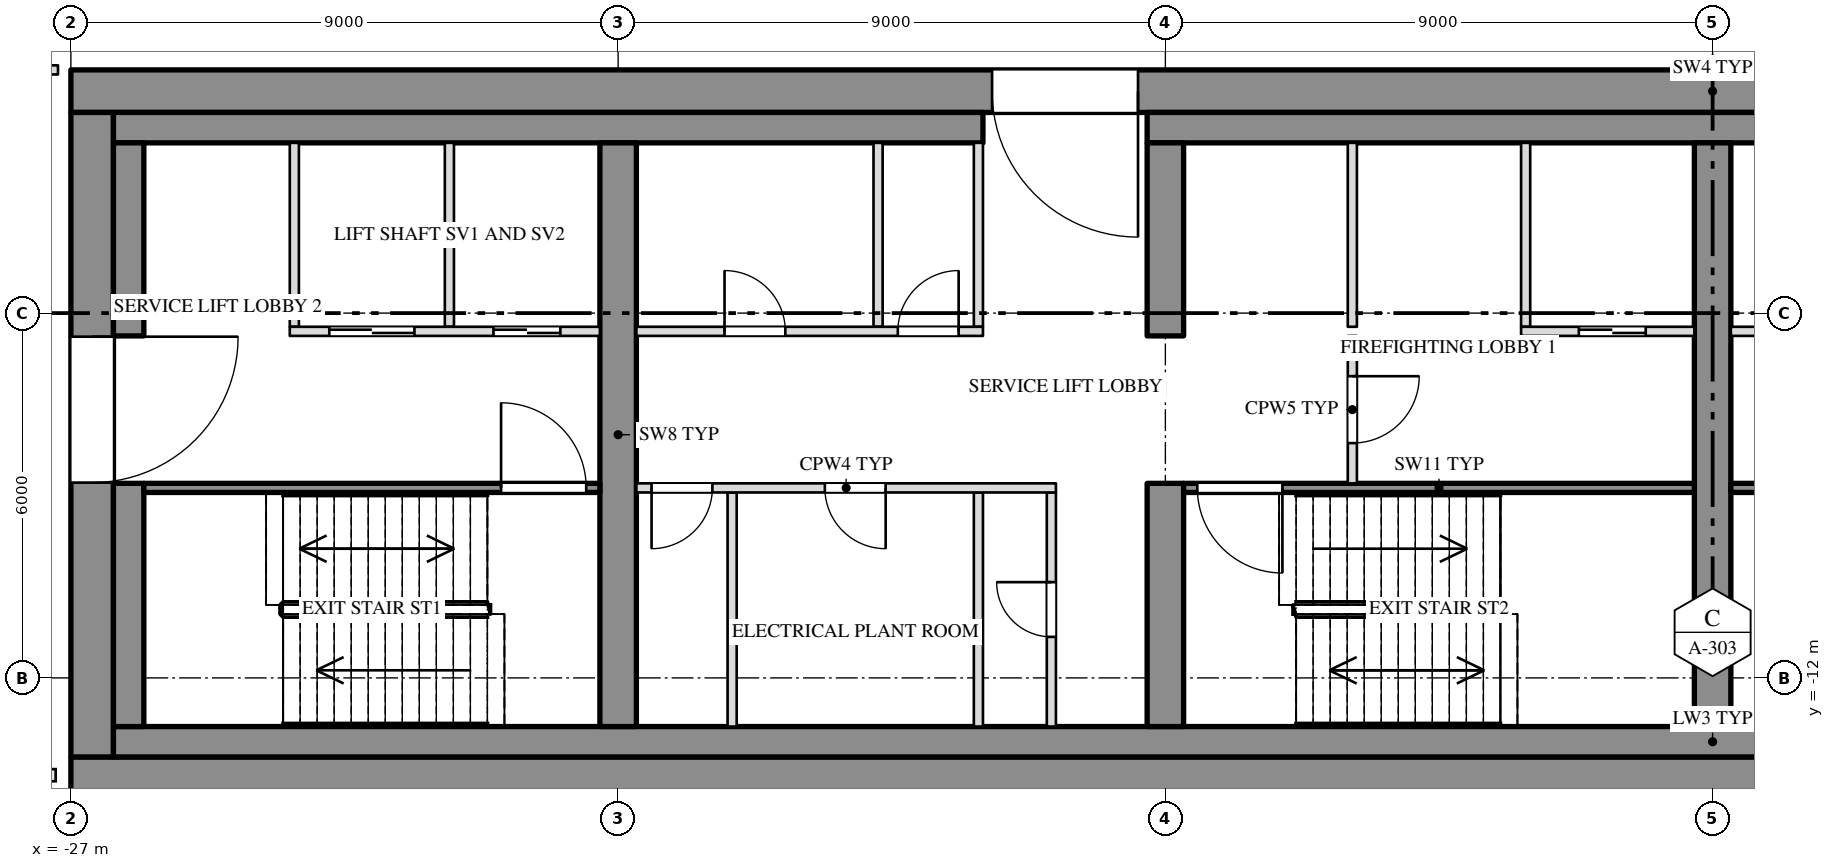
"""IFC4 building model, lengths in metres.
Left out: names, types, materials, properties, quantities, classifications, styles, units other than length and angle.
Written with IfcOpenShell. Run it as: python <this file> out.ifc"""

import sys

from ifc_helpers import new_model, si_unit, direction, frame, frame_2d, origin, place, context, subcontext, project, spatial, rectangle, extrude, element, fill, save


model = new_model("IFC4")
c1 = context("Model", 3, precision=1e-05, world=origin(), true_north=direction((0.0, 1.0)))
c2 = subcontext(c1, "Body", "Model", "MODEL_VIEW")
j1 = project(units=[si_unit("LENGTHUNIT", "METRE"), si_unit("PLANEANGLEUNIT", "RADIAN")], contexts=[c1])
p1 = place(None, origin())
s1 = spatial("IfcSite", under=j1, at=p1, CompositionType="ELEMENT")
p2 = place(p1, origin())
s2 = spatial("IfcBuilding", under=s1, at=p2, CompositionType="ELEMENT")
p3 = place(p2, frame((0.0, 0.0, 216.5)))
s3 = spatial("IfcBuildingStorey", under=s2, at=p3, CompositionType="ELEMENT", Elevation=216.5)
p4 = place(p3, frame((-27.0, -2.35, 0.0), z_axis=(0.0, 0.0, 1.0), x_axis=(1.0, 0.0, 0.0)))
e1 = element("IfcWall", 1, at=p4, inside=s3, PredefinedType="SHEAR", context=c2, shape_type="SweptSolid", body=[
    extrude(rectangle(XDim=54.0, YDim=0.7, at=frame_2d((27.0, 0.0))), origin(), (0.0, 0.0, 1.0), 3.8),
])
p5 = place(p4, frame((15.15, 0.0, 0.0)))
e2 = element("IfcOpeningElement", 2, at=p5, cuts=e1, PredefinedType="OPENING", context=c2, shape_type="SweptSolid", body=[
    extrude(rectangle(XDim=2.4, YDim=2.1, at=frame_2d((1.2, 1.05))), frame((0.0, 0.362, 0.0), z_axis=(0.0, -1.0, 0.0), x_axis=(1.0, 0.0, 0.0)), (0.0, 0.0, 1.0), 0.724),
])
p6 = place(p4, frame((36.45, 0.0, 0.0)))
e3 = element("IfcOpeningElement", 3, at=p6, cuts=e1, PredefinedType="OPENING", context=c2, shape_type="SweptSolid", body=[
    extrude(rectangle(XDim=2.4, YDim=2.1, at=frame_2d((1.2, 1.05))), frame((0.0, 0.362, 0.0), z_axis=(0.0, -1.0, 0.0), x_axis=(1.0, 0.0, 0.0)), (0.0, 0.0, 1.0), 0.724),
])
p7 = place(p3, frame((-27.0, -13.65, 0.0), z_axis=(0.0, 0.0, 1.0), x_axis=(1.0, 0.0, 0.0)))
e4 = element("IfcWall", 4, at=p7, inside=s3, PredefinedType="SHEAR", context=c2, shape_type="SweptSolid", body=[
    extrude(rectangle(XDim=54.0, YDim=0.7, at=frame_2d((27.0, 0.0))), origin(), (0.0, 0.0, 1.0), 3.8),
])
p8 = place(p3, frame((-26.65, -13.3, 0.0), z_axis=(0.0, 0.0, 1.0), x_axis=(0.0, 1.0, 0.0)))
e5 = element("IfcWall", 5, at=p8, inside=s3, PredefinedType="SHEAR", context=c2, shape_type="SweptSolid", body=[
    extrude(rectangle(XDim=10.6, YDim=0.7, at=frame_2d((5.3, 0.0))), origin(), (0.0, 0.0, 1.0), 3.8),
])
p9 = place(p8, frame((4.512, 0.0, 0.0)))
e6 = element("IfcOpeningElement", 6, at=p9, cuts=e5, PredefinedType="OPENING", context=c2, shape_type="SweptSolid", body=[
    extrude(rectangle(XDim=2.4, YDim=2.1, at=frame_2d((1.2, 1.05))), frame((0.0, 0.362, 0.0), z_axis=(0.0, -1.0, 0.0), x_axis=(1.0, 0.0, 0.0)), (0.0, 0.0, 1.0), 0.724),
])
p10 = place(p3, frame((-26.3, -2.95, 0.0), z_axis=(0.0, 0.0, 1.0), x_axis=(1.0, 0.0, 0.0)))
e7 = element("IfcWall", 7, at=p10, inside=s3, PredefinedType="SHEAR", context=c2, shape_type="SweptSolid", body=[
    extrude(rectangle(XDim=14.3, YDim=0.5, at=frame_2d((7.15, 0.0))), origin(), (0.0, 0.0, 1.0), 3.8),
])
p11 = place(p3, frame((-9.3, -2.95, 0.0), z_axis=(0.0, 0.0, 1.0), x_axis=(1.0, 0.0, 0.0)))
e8 = element("IfcWall", 8, at=p11, inside=s3, PredefinedType="SHEAR", context=c2, shape_type="SweptSolid", body=[
    extrude(rectangle(XDim=18.6, YDim=0.5, at=frame_2d((9.3, 0.0))), origin(), (0.0, 0.0, 1.0), 3.8),
])
p12 = place(p3, frame((-26.3, -13.05, 0.0), z_axis=(0.0, 0.0, 1.0), x_axis=(1.0, 0.0, 0.0)))
e9 = element("IfcWall", 9, at=p12, inside=s3, PredefinedType="SHEAR", context=c2, shape_type="SweptSolid", body=[
    extrude(rectangle(XDim=52.6, YDim=0.5, at=frame_2d((26.3, 0.0))), origin(), (0.0, 0.0, 1.0), 3.8),
])
p13 = place(p3, frame((-26.05, -12.8, 0.0), z_axis=(0.0, 0.0, 1.0), x_axis=(0.0, 1.0, 0.0)))
e10 = element("IfcWall", 10, at=p13, inside=s3, PredefinedType="SHEAR", context=c2, shape_type="SweptSolid", body=[
    extrude(rectangle(XDim=4.0, YDim=0.5, at=frame_2d((2.0, 0.0))), origin(), (0.0, 0.0, 1.0), 3.8),
])
p14 = place(p3, frame((-26.05, -6.375, 0.0), z_axis=(0.0, 0.0, 1.0), x_axis=(0.0, 1.0, 0.0)))
e11 = element("IfcWall", 11, at=p14, inside=s3, PredefinedType="SHEAR", context=c2, shape_type="SweptSolid", body=[
    extrude(rectangle(XDim=3.175, YDim=0.5, at=frame_2d((1.587, 0.0))), origin(), (0.0, 0.0, 1.0), 3.8),
])
p15 = place(p3, frame((-18.0, -12.8, 0.0), z_axis=(0.0, 0.0, 1.0), x_axis=(0.0, 1.0, 0.0)))
e12 = element("IfcWall", 12, at=p15, inside=s3, PredefinedType="SHEAR", context=c2, shape_type="SweptSolid", body=[
    extrude(rectangle(XDim=9.6, YDim=0.6, at=frame_2d((4.8, 0.0))), origin(), (0.0, 0.0, 1.0), 3.8),
])
p16 = place(p3, frame((-9.0, -12.8, 0.0), z_axis=(0.0, 0.0, 1.0), x_axis=(0.0, 1.0, 0.0)))
e13 = element("IfcWall", 13, at=p16, inside=s3, PredefinedType="SHEAR", context=c2, shape_type="SweptSolid", body=[
    extrude(rectangle(XDim=4.0, YDim=0.6, at=frame_2d((2.0, 0.0))), origin(), (0.0, 0.0, 1.0), 3.8),
])
p17 = place(p3, frame((-9.0, -6.375, 0.0), z_axis=(0.0, 0.0, 1.0), x_axis=(0.0, 1.0, 0.0)))
e14 = element("IfcWall", 14, at=p17, inside=s3, PredefinedType="SHEAR", context=c2, shape_type="SweptSolid", body=[
    extrude(rectangle(XDim=3.175, YDim=0.6, at=frame_2d((1.587, 0.0))), origin(), (0.0, 0.0, 1.0), 3.8),
])
p18 = place(p3, frame((0.0, -12.8, 0.0), z_axis=(0.0, 0.0, 1.0), x_axis=(0.0, 1.0, 0.0)))
e15 = element("IfcWall", 15, at=p18, inside=s3, PredefinedType="SHEAR", context=c2, shape_type="SweptSolid", body=[
    extrude(rectangle(XDim=9.6, YDim=0.6, at=frame_2d((4.8, 0.0))), origin(), (0.0, 0.0, 1.0), 3.8),
])
p19 = place(p3, frame((-30.975, -2.0, 0.0), z_axis=(0.0, 0.0, 1.0), x_axis=(1.0, 0.0, 0.0)))
e16 = element("IfcWall", 16, at=p19, inside=s3, PredefinedType="PARTITIONING", context=c2, shape_type="SweptSolid", body=[
    extrude(rectangle(XDim=3.763, YDim=0.15, at=frame_2d((1.882, 0.0))), origin(), (0.0, 0.0, 1.0), 3.8),
])
p20 = place(p19, frame((1.425, 0.0, 0.0)))
e17 = element("IfcOpeningElement", 17, at=p20, cuts=e16, PredefinedType="OPENING", context=c2, shape_type="SweptSolid", body=[
    extrude(rectangle(XDim=1.0, YDim=2.1, at=frame_2d((0.5, 1.05))), frame((0.0, 0.087, 0.0), z_axis=(0.0, -1.0, 0.0), x_axis=(1.0, 0.0, 0.0)), (0.0, 0.0, 1.0), 0.174),
])
for number, where, z_axis, x_axis in (
    (18, (-20.775, -6.225, 0.0), (0.0, 0.0, 1.0), (0.0, 1.0, 0.0)),
    (19, (-23.325, -6.225, 0.0), (0.0, 0.0, 1.0), (0.0, 1.0, 0.0)),
    (20, (-12.075, -6.225, 0.0), (0.0, 0.0, 1.0), (0.0, 1.0, 0.0)),
    (21, (-13.725, -6.225, 0.0), (0.0, 0.0, 1.0), (0.0, 1.0, 0.0)),
    (22, (-3.075, -6.225, 0.0), (0.0, 0.0, 1.0), (0.0, 1.0, 0.0)),
    (23, (-5.925, -6.225, 0.0), (0.0, 0.0, 1.0), (0.0, 1.0, 0.0)),
):
    element("IfcWall", number, at=place(p3, frame(where, z_axis=z_axis, x_axis=x_axis)), inside=s3, PredefinedType="PARTITIONING", context=c2, shape_type="SweptSolid", body=[
        extrude(rectangle(XDim=3.025, YDim=0.15, at=frame_2d((1.513, 0.0))), origin(), (0.0, 0.0, 1.0), 3.8),
    ])
p21 = place(p3, frame((-10.875, -12.8, 0.0), z_axis=(0.0, 0.0, 1.0), x_axis=(0.0, 1.0, 0.0)))
e24 = element("IfcWall", 24, at=p21, inside=s3, PredefinedType="PARTITIONING", context=c2, shape_type="SweptSolid", body=[
    extrude(rectangle(XDim=3.85, YDim=0.15, at=frame_2d((1.925, 0.0))), origin(), (0.0, 0.0, 1.0), 3.8),
])
p22 = place(p21, frame((1.475, 0.0, 0.0)))
e25 = element("IfcOpeningElement", 25, at=p22, cuts=e24, PredefinedType="OPENING", context=c2, shape_type="SweptSolid", body=[
    extrude(rectangle(XDim=0.9, YDim=2.1, at=frame_2d((0.45, 1.05))), frame((0.0, 0.087, 0.0), z_axis=(0.0, -1.0, 0.0), x_axis=(1.0, 0.0, 0.0)), (0.0, 0.0, 1.0), 0.174),
])
for number, where, z_axis, x_axis in (
    (26, (-12.075, -12.8, 0.0), (0.0, 0.0, 1.0), (0.0, 1.0, 0.0)),
    (27, (-16.125, -12.8, 0.0), (0.0, 0.0, 1.0), (0.0, 1.0, 0.0)),
):
    element("IfcWall", number, at=place(p3, frame(where, z_axis=z_axis, x_axis=x_axis)), inside=s3, PredefinedType="PARTITIONING", context=c2, shape_type="SweptSolid", body=[
        extrude(rectangle(XDim=3.85, YDim=0.15, at=frame_2d((1.925, 0.0))), origin(), (0.0, 0.0, 1.0), 3.8),
    ])
p23 = place(p3, frame((-5.925, -8.8, 0.0), z_axis=(0.0, 0.0, 1.0), x_axis=(0.0, 1.0, 0.0)))
e28 = element("IfcWall", 28, at=p23, inside=s3, PredefinedType="PARTITIONING", context=c2, shape_type="SweptSolid", body=[
    extrude(rectangle(XDim=2.425, YDim=0.15, at=frame_2d((1.212, 0.0))), origin(), (0.0, 0.0, 1.0), 3.8),
])
p24 = place(p23, frame((0.662, 0.0, 0.0)))
e29 = element("IfcOpeningElement", 29, at=p24, cuts=e28, PredefinedType="OPENING", context=c2, shape_type="SweptSolid", body=[
    extrude(rectangle(XDim=1.1, YDim=2.1, at=frame_2d((0.55, 1.05))), frame((0.0, 0.087, 0.0), z_axis=(0.0, -1.0, 0.0), x_axis=(1.0, 0.0, 0.0)), (0.0, 0.0, 1.0), 0.174),
])
p25 = place(p3, frame((-23.4, -6.3, 0.0), z_axis=(0.0, 0.0, 1.0), x_axis=(1.0, 0.0, 0.0)))
e30 = element("IfcWall", 30, at=p25, inside=s3, PredefinedType="PARTITIONING", context=c2, shape_type="SweptSolid", body=[
    extrude(rectangle(XDim=5.1, YDim=0.15, at=frame_2d((2.55, 0.0))), origin(), (0.0, 0.0, 1.0), 3.8),
])
p26 = place(p25, frame((0.65, 0.0, 0.0)))
e31 = element("IfcOpeningElement", 31, at=p26, cuts=e30, PredefinedType="OPENING", context=c2, shape_type="SweptSolid", body=[
    extrude(rectangle(XDim=1.4, YDim=2.1, at=frame_2d((0.7, 1.05))), frame((0.0, 0.087, 0.0), z_axis=(0.0, -1.0, 0.0), x_axis=(1.0, 0.0, 0.0)), (0.0, 0.0, 1.0), 0.174),
])
p27 = place(p25, frame((3.35, 0.0, 0.0)))
e32 = element("IfcOpeningElement", 32, at=p27, cuts=e30, PredefinedType="OPENING", context=c2, shape_type="SweptSolid", body=[
    extrude(rectangle(XDim=1.1, YDim=2.1, at=frame_2d((0.55, 1.05))), frame((0.0, 0.087, 0.0), z_axis=(0.0, -1.0, 0.0), x_axis=(1.0, 0.0, 0.0)), (0.0, 0.0, 1.0), 0.174),
])
p28 = place(p3, frame((-17.7, -6.3, 0.0), z_axis=(0.0, 0.0, 1.0), x_axis=(1.0, 0.0, 0.0)))
e33 = element("IfcWall", 33, at=p28, inside=s3, PredefinedType="PARTITIONING", context=c2, shape_type="SweptSolid", body=[
    extrude(rectangle(XDim=5.7, YDim=0.15, at=frame_2d((2.85, 0.0))), origin(), (0.0, 0.0, 1.0), 3.8),
])
p29 = place(p28, frame((1.45, 0.0, 0.0)))
e34 = element("IfcOpeningElement", 34, at=p29, cuts=e33, PredefinedType="OPENING", context=c2, shape_type="SweptSolid", body=[
    extrude(rectangle(XDim=1.0, YDim=2.1, at=frame_2d((0.5, 1.05))), frame((0.0, 0.087, 0.0), z_axis=(0.0, -1.0, 0.0), x_axis=(1.0, 0.0, 0.0)), (0.0, 0.0, 1.0), 0.174),
])
p30 = place(p28, frame((4.3, 0.0, 0.0)))
e35 = element("IfcOpeningElement", 35, at=p30, cuts=e33, PredefinedType="OPENING", context=c2, shape_type="SweptSolid", body=[
    extrude(rectangle(XDim=1.0, YDim=2.1, at=frame_2d((0.5, 1.05))), frame((0.0, 0.087, 0.0), z_axis=(0.0, -1.0, 0.0), x_axis=(1.0, 0.0, 0.0)), (0.0, 0.0, 1.0), 0.174),
])
p31 = place(p3, frame((-3.15, -6.3, 0.0), z_axis=(0.0, 0.0, 1.0), x_axis=(1.0, 0.0, 0.0)))
e36 = element("IfcWall", 36, at=p31, inside=s3, PredefinedType="PARTITIONING", context=c2, shape_type="SweptSolid", body=[
    extrude(rectangle(XDim=2.85, YDim=0.15, at=frame_2d((1.425, 0.0))), origin(), (0.0, 0.0, 1.0), 3.8),
])
p32 = place(p31, frame((0.95, 0.0, 0.0)))
e37 = element("IfcOpeningElement", 37, at=p32, cuts=e36, PredefinedType="OPENING", context=c2, shape_type="SweptSolid", body=[
    extrude(rectangle(XDim=1.1, YDim=2.1, at=frame_2d((0.55, 1.05))), frame((0.0, 0.087, 0.0), z_axis=(0.0, -1.0, 0.0), x_axis=(1.0, 0.0, 0.0)), (0.0, 0.0, 1.0), 0.174),
])
p33 = place(p3, frame((0.3, -6.3, 0.0), z_axis=(0.0, 0.0, 1.0), x_axis=(1.0, 0.0, 0.0)))
e38 = element("IfcWall", 38, at=p33, inside=s3, PredefinedType="PARTITIONING", context=c2, shape_type="SweptSolid", body=[
    extrude(rectangle(XDim=2.85, YDim=0.15, at=frame_2d((1.425, 0.0))), origin(), (0.0, 0.0, 1.0), 3.8),
])
p34 = place(p33, frame((0.8, 0.0, 0.0)))
e39 = element("IfcOpeningElement", 39, at=p34, cuts=e38, PredefinedType="OPENING", context=c2, shape_type="SweptSolid", body=[
    extrude(rectangle(XDim=1.1, YDim=2.1, at=frame_2d((0.55, 1.05))), frame((0.0, 0.087, 0.0), z_axis=(0.0, -1.0, 0.0), x_axis=(1.0, 0.0, 0.0)), (0.0, 0.0, 1.0), 0.174),
])
p35 = place(p3, frame((-25.8, -8.875, 0.0), z_axis=(0.0, 0.0, 1.0), x_axis=(1.0, 0.0, 0.0)))
e40 = element("IfcWall", 40, at=p35, inside=s3, PredefinedType="SHEAR", context=c2, shape_type="SweptSolid", body=[
    extrude(rectangle(XDim=7.5, YDim=0.15, at=frame_2d((3.75, 0.0))), origin(), (0.0, 0.0, 1.0), 3.8),
])
p36 = place(p35, frame((5.875, 0.0, 0.0)))
e41 = element("IfcOpeningElement", 41, at=p36, cuts=e40, PredefinedType="OPENING", context=c2, shape_type="SweptSolid", body=[
    extrude(rectangle(XDim=1.4, YDim=2.1, at=frame_2d((0.7, 1.05))), frame((0.0, 0.087, 0.0), z_axis=(0.0, -1.0, 0.0), x_axis=(1.0, 0.0, 0.0)), (0.0, 0.0, 1.0), 0.174),
])
p37 = place(p3, frame((-17.7, -8.875, 0.0), z_axis=(0.0, 0.0, 1.0), x_axis=(1.0, 0.0, 0.0)))
e42 = element("IfcWall", 42, at=p37, inside=s3, PredefinedType="PARTITIONING", context=c2, shape_type="SweptSolid", body=[
    extrude(rectangle(XDim=6.9, YDim=0.15, at=frame_2d((3.45, 0.0))), origin(), (0.0, 0.0, 1.0), 3.8),
])
p38 = place(p37, frame((0.25, 0.0, 0.0)))
e43 = element("IfcOpeningElement", 43, at=p38, cuts=e42, PredefinedType="OPENING", context=c2, shape_type="SweptSolid", body=[
    extrude(rectangle(XDim=1.0, YDim=2.1, at=frame_2d((0.5, 1.05))), frame((0.0, 0.087, 0.0), z_axis=(0.0, -1.0, 0.0), x_axis=(1.0, 0.0, 0.0)), (0.0, 0.0, 1.0), 0.174),
])
p39 = place(p37, frame((3.1, 0.0, 0.0)))
e44 = element("IfcOpeningElement", 44, at=p39, cuts=e42, PredefinedType="OPENING", context=c2, shape_type="SweptSolid", body=[
    extrude(rectangle(XDim=1.0, YDim=2.1, at=frame_2d((0.5, 1.05))), frame((0.0, 0.087, 0.0), z_axis=(0.0, -1.0, 0.0), x_axis=(1.0, 0.0, 0.0)), (0.0, 0.0, 1.0), 0.174),
])
p40 = place(p3, frame((-8.7, -8.875, 0.0), z_axis=(0.0, 0.0, 1.0), x_axis=(1.0, 0.0, 0.0)))
e45 = element("IfcWall", 45, at=p40, inside=s3, PredefinedType="SHEAR", context=c2, shape_type="SweptSolid", body=[
    extrude(rectangle(XDim=8.4, YDim=0.15, at=frame_2d((4.2, 0.0))), origin(), (0.0, 0.0, 1.0), 3.8),
])
p41 = place(p40, frame((0.225, 0.0, 0.0)))
e46 = element("IfcOpeningElement", 46, at=p41, cuts=e45, PredefinedType="OPENING", context=c2, shape_type="SweptSolid", body=[
    extrude(rectangle(XDim=1.4, YDim=2.1, at=frame_2d((0.7, 1.05))), frame((0.0, 0.087, 0.0), z_axis=(0.0, -1.0, 0.0), x_axis=(1.0, 0.0, 0.0)), (0.0, 0.0, 1.0), 0.174),
])
p42 = place(p3, frame((0.3, -8.875, 0.0), z_axis=(0.0, 0.0, 1.0), x_axis=(1.0, 0.0, 0.0)))
e47 = element("IfcWall", 47, at=p42, inside=s3, PredefinedType="SHEAR", context=c2, shape_type="SweptSolid", body=[
    extrude(rectangle(XDim=8.4, YDim=0.15, at=frame_2d((4.2, 0.0))), origin(), (0.0, 0.0, 1.0), 3.8),
])
p43 = place(p42, frame((6.775, 0.0, 0.0)))
e48 = element("IfcOpeningElement", 48, at=p43, cuts=e47, PredefinedType="OPENING", context=c2, shape_type="SweptSolid", body=[
    extrude(rectangle(XDim=1.4, YDim=2.1, at=frame_2d((0.7, 1.05))), frame((0.0, 0.087, 0.0), z_axis=(0.0, -1.0, 0.0), x_axis=(1.0, 0.0, 0.0)), (0.0, 0.0, 1.0), 0.174),
])
p44 = place(p9, origin())
e49 = element("IfcDoor", 49, at=p44, inside=s3, OperationType="DOUBLE_DOOR_SINGLE_SWING", PredefinedType="DOOR", context=c2, shape_type="SweptSolid", body=[
    extrude(rectangle(XDim=2.4, YDim=2.1, at=frame_2d((1.2, 1.05))), frame((0.0, 0.025, 0.0), z_axis=(0.0, -1.0, 0.0), x_axis=(1.0, 0.0, 0.0)), (0.0, 0.0, 1.0), 0.05),
])
fill(e6, e49)
p45 = place(p26, origin())
e50 = element("IfcDoor", 50, at=p45, inside=s3, OperationType="SLIDING_TO_RIGHT", PredefinedType="DOOR", context=c2, shape_type="SweptSolid", body=[
    extrude(rectangle(XDim=1.4, YDim=2.1, at=frame_2d((0.7, 1.05))), frame((0.0, 0.025, 0.0), z_axis=(0.0, -1.0, 0.0), x_axis=(1.0, 0.0, 0.0)), (0.0, 0.0, 1.0), 0.05),
])
fill(e31, e50)
p46 = place(p27, origin())
e51 = element("IfcDoor", 51, at=p46, inside=s3, OperationType="SLIDING_TO_LEFT", PredefinedType="DOOR", context=c2, shape_type="SweptSolid", body=[
    extrude(rectangle(XDim=1.1, YDim=2.1, at=frame_2d((0.55, 1.05))), frame((0.0, 0.025, 0.0), z_axis=(0.0, -1.0, 0.0), x_axis=(1.0, 0.0, 0.0)), (0.0, 0.0, 1.0), 0.05),
])
fill(e32, e51)
p47 = place(p36, origin())
e52 = element("IfcDoor", 52, at=p47, inside=s3, OperationType="DOUBLE_DOOR_SINGLE_SWING", PredefinedType="DOOR", context=c2, shape_type="SweptSolid", body=[
    extrude(rectangle(XDim=1.4, YDim=2.1, at=frame_2d((0.7, 1.05))), frame((0.0, 0.025, 0.0), z_axis=(0.0, -1.0, 0.0), x_axis=(1.0, 0.0, 0.0)), (0.0, 0.0, 1.0), 0.05),
])
fill(e41, e52)
p48 = place(p38, origin())
e53 = element("IfcDoor", 53, at=p48, inside=s3, OperationType="SINGLE_SWING_RIGHT", PredefinedType="DOOR", context=c2, shape_type="SweptSolid", body=[
    extrude(rectangle(XDim=1.0, YDim=2.1, at=frame_2d((0.5, 1.05))), frame((0.0, 0.025, 0.0), z_axis=(0.0, -1.0, 0.0), x_axis=(1.0, 0.0, 0.0)), (0.0, 0.0, 1.0), 0.05),
])
fill(e43, e53)
p49 = place(p29, origin())
e54 = element("IfcDoor", 54, at=p49, inside=s3, OperationType="SINGLE_SWING_LEFT", PredefinedType="DOOR", context=c2, shape_type="SweptSolid", body=[
    extrude(rectangle(XDim=1.0, YDim=2.1, at=frame_2d((0.5, 1.05))), frame((0.0, 0.025, 0.0), z_axis=(0.0, -1.0, 0.0), x_axis=(1.0, 0.0, 0.0)), (0.0, 0.0, 1.0), 0.05),
])
fill(e34, e54)
p50 = place(p39, origin())
e55 = element("IfcDoor", 55, at=p50, inside=s3, OperationType="SINGLE_SWING_LEFT", PredefinedType="DOOR", context=c2, shape_type="SweptSolid", body=[
    extrude(rectangle(XDim=1.0, YDim=2.1, at=frame_2d((0.5, 1.05))), frame((0.0, 0.025, 0.0), z_axis=(0.0, -1.0, 0.0), x_axis=(1.0, 0.0, 0.0)), (0.0, 0.0, 1.0), 0.05),
])
fill(e44, e55)
p51 = place(p30, origin())
e56 = element("IfcDoor", 56, at=p51, inside=s3, OperationType="SINGLE_SWING_RIGHT", PredefinedType="DOOR", context=c2, shape_type="SweptSolid", body=[
    extrude(rectangle(XDim=1.0, YDim=2.1, at=frame_2d((0.5, 1.05))), frame((0.0, 0.025, 0.0), z_axis=(0.0, -1.0, 0.0), x_axis=(1.0, 0.0, 0.0)), (0.0, 0.0, 1.0), 0.05),
])
fill(e35, e56)
p52 = place(p22, origin())
e57 = element("IfcDoor", 57, at=p52, inside=s3, OperationType="SINGLE_SWING_RIGHT", PredefinedType="DOOR", context=c2, shape_type="SweptSolid", body=[
    extrude(rectangle(XDim=0.9, YDim=2.1, at=frame_2d((0.45, 1.05))), frame((0.0, 0.025, 0.0), z_axis=(0.0, -1.0, 0.0), x_axis=(1.0, 0.0, 0.0)), (0.0, 0.0, 1.0), 0.05),
])
fill(e25, e57)
p53 = place(p5, origin())
e58 = element("IfcDoor", 58, at=p53, inside=s3, OperationType="DOUBLE_DOOR_SINGLE_SWING", PredefinedType="DOOR", context=c2, shape_type="SweptSolid", body=[
    extrude(rectangle(XDim=2.4, YDim=2.1, at=frame_2d((1.2, 1.05))), frame((0.0, 0.025, 0.0), z_axis=(0.0, -1.0, 0.0), x_axis=(1.0, 0.0, 0.0)), (0.0, 0.0, 1.0), 0.05),
])
fill(e2, e58)
p54 = place(p41, origin())
e59 = element("IfcDoor", 59, at=p54, inside=s3, OperationType="DOUBLE_DOOR_SINGLE_SWING", PredefinedType="DOOR", context=c2, shape_type="SweptSolid", body=[
    extrude(rectangle(XDim=1.4, YDim=2.1, at=frame_2d((0.7, 1.05))), frame((0.0, 0.025, 0.0), z_axis=(0.0, -1.0, 0.0), x_axis=(1.0, 0.0, 0.0)), (0.0, 0.0, 1.0), 0.05),
])
fill(e46, e59)
p55 = place(p24, origin())
e60 = element("IfcDoor", 60, at=p55, inside=s3, OperationType="SINGLE_SWING_LEFT", PredefinedType="DOOR", context=c2, shape_type="SweptSolid", body=[
    extrude(rectangle(XDim=1.1, YDim=2.1, at=frame_2d((0.55, 1.05))), frame((0.0, 0.025, 0.0), z_axis=(0.0, -1.0, 0.0), x_axis=(1.0, 0.0, 0.0)), (0.0, 0.0, 1.0), 0.05),
])
fill(e29, e60)
p56 = place(p32, origin())
e61 = element("IfcDoor", 61, at=p56, inside=s3, OperationType="SLIDING_TO_LEFT", PredefinedType="DOOR", context=c2, shape_type="SweptSolid", body=[
    extrude(rectangle(XDim=1.1, YDim=2.1, at=frame_2d((0.55, 1.05))), frame((0.0, 0.025, 0.0), z_axis=(0.0, -1.0, 0.0), x_axis=(1.0, 0.0, 0.0)), (0.0, 0.0, 1.0), 0.05),
])
fill(e37, e61)
save(model, sys.argv[1])
